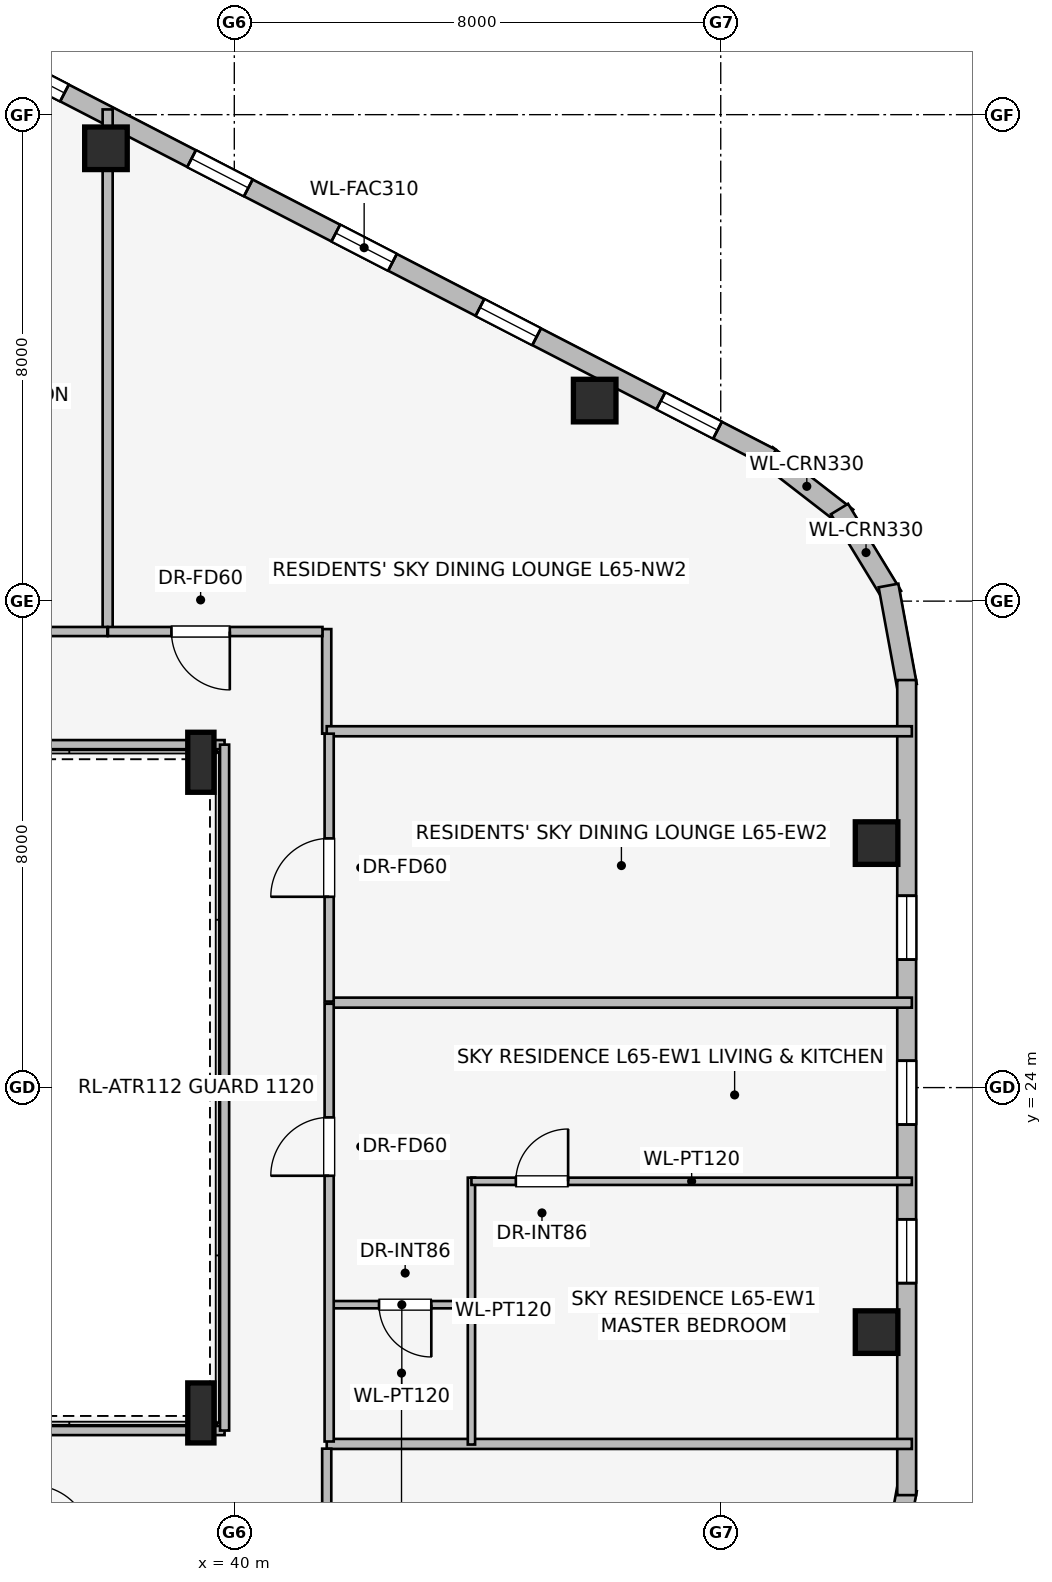
"""IFC4 building model, lengths in metres.
Left out: names, types, materials, properties, quantities, classifications, styles, units other than length and angle.
Written with IfcOpenShell. Run it as: python <this file> out.ifc"""

import sys

from ifc_helpers import new_model, si_unit, direction, frame, frame_2d, origin, origin_2d, place, context, subcontext, project, spatial, rectangle, i_section, extrude, element, fill, save


model = new_model("IFC4")
c1 = context("Model", 3, precision=1e-05, world=origin(), true_north=direction((0.0, 1.0)))
c2 = subcontext(c1, "Body", "Model", "MODEL_VIEW")
j1 = project(units=[si_unit("LENGTHUNIT", "METRE"), si_unit("PLANEANGLEUNIT", "RADIAN")], contexts=[c1])
p1 = place(None, origin())
s1 = spatial("IfcSite", under=j1, at=p1, CompositionType="ELEMENT")
p2 = place(p1, origin())
s2 = spatial("IfcBuilding", under=s1, at=p2, CompositionType="ELEMENT")
p3 = place(p2, frame((0.0, 0.0, 238.35)))
s3 = spatial("IfcBuildingStorey", under=s2, at=p3, CompositionType="ELEMENT", Elevation=238.35)
for number, where, z_axis, x_axis in (
    (1, (45.927, 35.298, 0.0), (0.0, 0.0, 1.0), (1.0, 0.0, 0.0)),
    (2, (37.889, 39.447, 0.0), (0.0, 0.0, 1.0), (1.0, 0.0, 0.0)),
    (3, (50.563, 19.979, 0.0), (0.0, 0.0, 1.0), (1.0, 0.0, 0.0)),
    (4, (50.563, 28.021, 0.0), (0.0, 0.0, 1.0), (1.0, 0.0, 0.0)),
):
    element("IfcColumn", number, at=place(p3, frame(where, z_axis=z_axis, x_axis=x_axis)), inside=s3, PredefinedType="COLUMN", context=c2, shape_type="SweptSolid", body=[
        extrude(rectangle(XDim=0.7, YDim=0.7, at=origin_2d()), origin(), (0.0, 0.0, 1.0), 3.55),
    ])
for number, where, z_axis, x_axis in (
    (5, (39.45, 18.65, 0.0), (0.0, 0.0, 1.0), (1.0, 0.0, 0.0)),
    (6, (39.45, 29.35, 0.0), (0.0, 0.0, 1.0), (1.0, 0.0, 0.0)),
):
    element("IfcColumn", number, at=place(p3, frame(where, z_axis=z_axis, x_axis=x_axis)), inside=s3, PredefinedType="COLUMN", context=c2, shape_type="SweptSolid", body=[
        extrude(i_section(OverallWidth=0.431, OverallDepth=0.987, WebThickness=0.034, FlangeThickness=0.062, at=origin_2d()), origin(), (0.0, 0.0, 1.0), 3.55),
    ])
p4 = place(p3, frame((48.753, 34.401, 0.0), z_axis=(0.0, 0.0, 1.0), x_axis=(0.790691856293, -0.61221433207, 0.0)))
e7 = element("IfcWall", 7, at=p4, inside=s3, PredefinedType="STANDARD", context=c2, shape_type="SweptSolid", body=[
    extrude(rectangle(XDim=1.676, YDim=0.33, at=frame_2d((0.838, 0.0))), origin(), (0.0, 0.0, 1.0), 3.26),
])
p5 = place(p3, frame((49.953, 33.515, 0.0), z_axis=(0.0, 0.0, 1.0), x_axis=(0.520325409202, -0.853968072318, 0.0)))
e8 = element("IfcWall", 8, at=p5, inside=s3, PredefinedType="STANDARD", context=c2, shape_type="SweptSolid", body=[
    extrude(rectangle(XDim=1.678, YDim=0.33, at=frame_2d((0.839, 0.0))), origin(), (0.0, 0.0, 1.0), 3.26),
])
p6 = place(p3, frame((50.759, 32.257, 0.0), z_axis=(0.0, 0.0, 1.0), x_axis=(0.180691763044, -0.983539773862, 0.0)))
e9 = element("IfcWall", 9, at=p6, inside=s3, PredefinedType="STANDARD", context=c2, shape_type="SweptSolid", body=[
    extrude(rectangle(XDim=1.677, YDim=0.33, at=frame_2d((0.838, 0.0))), origin(), (0.0, 0.0, 1.0), 3.26),
])
p7 = place(p3, frame((35.437, 41.27, 0.0), z_axis=(0.0, 0.0, 1.0), x_axis=(0.888581481622, -0.458718814218, 0.0)))
e10 = element("IfcWall", 10, at=p7, inside=s3, PredefinedType="STANDARD", context=c2, shape_type="SweptSolid", body=[
    extrude(rectangle(XDim=15.077, YDim=0.31, at=frame_2d((7.539, 0.0))), origin(), (0.0, 0.0, 1.0), 3.26),
])
p8 = place(p7, frame((0.942, 0.0, 0.75)))
e11 = element("IfcOpeningElement", 11, at=p8, cuts=e10, PredefinedType="OPENING", context=c2, shape_type="SweptSolid", body=[
    extrude(rectangle(XDim=1.05, YDim=1.4, at=frame_2d((0.525, 0.7))), frame((0.0, 0.165, 0.0), z_axis=(0.0, -1.0, 0.0), x_axis=(1.0, 0.0, 0.0)), (0.0, 0.0, 1.0), 0.33),
])
p9 = place(p7, frame((4.344, 0.0, 0.75)))
e12 = element("IfcOpeningElement", 12, at=p9, cuts=e10, PredefinedType="OPENING", context=c2, shape_type="SweptSolid", body=[
    extrude(rectangle(XDim=1.05, YDim=1.4, at=frame_2d((0.525, 0.7))), frame((0.0, 0.165, 0.0), z_axis=(0.0, -1.0, 0.0), x_axis=(1.0, 0.0, 0.0)), (0.0, 0.0, 1.0), 0.33),
])
p10 = place(p7, frame((7.013, 0.0, 0.75)))
e13 = element("IfcOpeningElement", 13, at=p10, cuts=e10, PredefinedType="OPENING", context=c2, shape_type="SweptSolid", body=[
    extrude(rectangle(XDim=1.05, YDim=1.4, at=frame_2d((0.525, 0.7))), frame((0.0, 0.165, 0.0), z_axis=(0.0, -1.0, 0.0), x_axis=(1.0, 0.0, 0.0)), (0.0, 0.0, 1.0), 0.33),
])
p11 = place(p7, frame((9.681, 0.0, 0.75)))
e14 = element("IfcOpeningElement", 14, at=p11, cuts=e10, PredefinedType="OPENING", context=c2, shape_type="SweptSolid", body=[
    extrude(rectangle(XDim=1.05, YDim=1.4, at=frame_2d((0.525, 0.7))), frame((0.0, 0.165, 0.0), z_axis=(0.0, -1.0, 0.0), x_axis=(1.0, 0.0, 0.0)), (0.0, 0.0, 1.0), 0.33),
])
p12 = place(p7, frame((13.029, 0.0, 0.75)))
e15 = element("IfcOpeningElement", 15, at=p12, cuts=e10, PredefinedType="OPENING", context=c2, shape_type="SweptSolid", body=[
    extrude(rectangle(XDim=1.05, YDim=1.4, at=frame_2d((0.525, 0.7))), frame((0.0, 0.165, 0.0), z_axis=(0.0, -1.0, 0.0), x_axis=(1.0, 0.0, 0.0)), (0.0, 0.0, 1.0), 0.33),
])
p13 = place(p3, frame((51.062, 17.392, 0.0), z_axis=(0.0, 0.0, 1.0), x_axis=(-0.180691763044, -0.983539773862, 0.0)))
e16 = element("IfcWall", 16, at=p13, inside=s3, PredefinedType="STANDARD", context=c2, shape_type="SweptSolid", body=[
    extrude(rectangle(XDim=1.677, YDim=0.33, at=frame_2d((0.838, 0.0))), origin(), (0.0, 0.0, 1.0), 3.26),
])
p14 = place(p3, frame((51.058, 30.702, 0.0), z_axis=(0.0, 0.0, 1.0), x_axis=(0.0, -1.0, 0.0)))
e17 = element("IfcWall", 17, at=p14, inside=s3, PredefinedType="STANDARD", context=c2, shape_type="SweptSolid", body=[
    extrude(rectangle(XDim=13.404, YDim=0.31, at=frame_2d((6.702, 0.0))), origin(), (0.0, 0.0, 1.0), 3.26),
])
p15 = place(p14, frame((3.547, 0.0, 0.75)))
e18 = element("IfcOpeningElement", 18, at=p15, cuts=e17, PredefinedType="OPENING", context=c2, shape_type="SweptSolid", body=[
    extrude(rectangle(XDim=1.05, YDim=1.4, at=frame_2d((0.525, 0.7))), frame((0.0, 0.165, 0.0), z_axis=(0.0, -1.0, 0.0), x_axis=(1.0, 0.0, 0.0)), (0.0, 0.0, 1.0), 0.33),
])
p16 = place(p14, frame((6.26, 0.0, 0.75)))
e19 = element("IfcOpeningElement", 19, at=p16, cuts=e17, PredefinedType="OPENING", context=c2, shape_type="SweptSolid", body=[
    extrude(rectangle(XDim=1.05, YDim=1.4, at=frame_2d((0.525, 0.7))), frame((0.0, 0.165, 0.0), z_axis=(0.0, -1.0, 0.0), x_axis=(1.0, 0.0, 0.0)), (0.0, 0.0, 1.0), 0.33),
])
p17 = place(p14, frame((8.868, 0.0, 0.75)))
e20 = element("IfcOpeningElement", 20, at=p17, cuts=e17, PredefinedType="OPENING", context=c2, shape_type="SweptSolid", body=[
    extrude(rectangle(XDim=1.05, YDim=1.4, at=frame_2d((0.525, 0.7))), frame((0.0, 0.165, 0.0), z_axis=(0.0, -1.0, 0.0), x_axis=(1.0, 0.0, 0.0)), (0.0, 0.0, 1.0), 0.33),
])
p18 = place(p3, frame((27.675, 18.36, 0.0), z_axis=(0.0, 0.0, 1.0), x_axis=(1.0, 0.0, 0.0)))
e21 = element("IfcWall", 21, at=p18, inside=s3, PredefinedType="PARTITIONING", context=c2, shape_type="SweptSolid", body=[
    extrude(rectangle(XDim=12.165, YDim=0.15, at=frame_2d((6.083, 0.0))), origin(), (0.0, 0.0, 1.0), 2.401),
])
p19 = place(p3, frame((39.84, 29.64, 0.0), z_axis=(0.0, 0.0, 1.0), x_axis=(-1.0, 0.0, 0.0)))
e22 = element("IfcWall", 22, at=p19, inside=s3, PredefinedType="PARTITIONING", context=c2, shape_type="SweptSolid", body=[
    extrude(rectangle(XDim=12.203, YDim=0.15, at=frame_2d((6.102, 0.0))), origin(), (0.0, 0.0, 1.0), 2.401),
])
p20 = place(p3, frame((39.84, 18.36, 0.0), z_axis=(0.0, 0.0, 1.0), x_axis=(0.0, 1.0, 0.0)))
e23 = element("IfcWall", 23, at=p20, inside=s3, PredefinedType="PARTITIONING", context=c2, shape_type="SweptSolid", body=[
    extrude(rectangle(XDim=11.28, YDim=0.15, at=frame_2d((5.64, 0.0))), origin(), (0.0, 0.0, 1.0), 3.26),
])
p21 = place(p3, frame((41.52, 29.82, 0.0), z_axis=(0.0, 0.0, 1.0), x_axis=(0.0, 1.0, 0.0)))
e24 = element("IfcWall", 24, at=p21, inside=s3, PredefinedType="PARTITIONING", context=c2, shape_type="SweptSolid", body=[
    extrude(rectangle(XDim=1.72, YDim=0.15, at=frame_2d((0.86, 0.0))), origin(), (0.0, 0.0, 1.0), 3.26),
])
p22 = place(p3, frame((37.917, 31.51, 0.0), z_axis=(0.0, 0.0, 1.0), x_axis=(0.0, 1.0, 0.0)))
e25 = element("IfcWall", 25, at=p22, inside=s3, PredefinedType="PARTITIONING", context=c2, shape_type="SweptSolid", body=[
    extrude(rectangle(XDim=8.576, YDim=0.165, at=frame_2d((4.288, 0.0))), origin(), (0.0, 0.0, 1.0), 2.649),
])
p23 = place(p3, frame((37.912, 31.5, 0.0), z_axis=(0.0, 0.0, 1.0), x_axis=(-1.0, 0.0, 0.0)))
e26 = element("IfcWall", 26, at=p23, inside=s3, PredefinedType="PARTITIONING", context=c2, shape_type="SweptSolid", body=[
    extrude(rectangle(XDim=3.622, YDim=0.15, at=frame_2d((1.811, 0.0))), origin(), (0.0, 0.0, 1.0), 3.26),
])
p24 = place(p23, frame((1.212, 0.0, 0.0)))
e27 = element("IfcOpeningElement", 27, at=p24, cuts=e26, PredefinedType="OPENING", context=c2, shape_type="SweptSolid", body=[
    extrude(rectangle(XDim=0.96, YDim=2.0, at=frame_2d((0.48, 1.0))), frame((0.0, 0.085, 0.0), z_axis=(0.0, -1.0, 0.0), x_axis=(1.0, 0.0, 0.0)), (0.0, 0.0, 1.0), 0.17),
])
p25 = place(p3, frame((41.45, 31.5, 0.0), z_axis=(0.0, 0.0, 1.0), x_axis=(-1.0, 0.0, 0.0)))
e28 = element("IfcWall", 28, at=p25, inside=s3, PredefinedType="PARTITIONING", context=c2, shape_type="SweptSolid", body=[
    extrude(rectangle(XDim=3.528, YDim=0.15, at=frame_2d((1.764, 0.0))), origin(), (0.0, 0.0, 1.0), 3.26),
])
p26 = place(p25, frame((1.524, 0.0, 0.0)))
e29 = element("IfcOpeningElement", 29, at=p26, cuts=e28, PredefinedType="OPENING", context=c2, shape_type="SweptSolid", body=[
    extrude(rectangle(XDim=0.96, YDim=2.0, at=frame_2d((0.48, 1.0))), frame((0.0, 0.085, 0.0), z_axis=(0.0, -1.0, 0.0), x_axis=(1.0, 0.0, 0.0)), (0.0, 0.0, 1.0), 0.17),
])
for number, where, z_axis, x_axis in (
    (30, (41.52, 18.14, 0.0), (0.0, 0.0, 1.0), (1.0, 0.0, 0.0)),
    (31, (41.52, 29.86, 0.0), (0.0, 0.0, 1.0), (1.0, 0.0, 0.0)),
):
    element("IfcWall", number, at=place(p3, frame(where, z_axis=z_axis, x_axis=x_axis)), inside=s3, PredefinedType="PARTITIONING", context=c2, shape_type="SweptSolid", body=[
        extrude(rectangle(XDim=9.623, YDim=0.165, at=frame_2d((4.812, 0.0))), origin(), (0.0, 0.0, 1.0), 3.26),
    ])
p27 = place(p3, frame((41.59, 25.397, 0.0), z_axis=(0.0, 0.0, 1.0), x_axis=(1.0, 0.0, 0.0)))
e32 = element("IfcWall", 32, at=p27, inside=s3, PredefinedType="PARTITIONING", context=c2, shape_type="SweptSolid", body=[
    extrude(rectangle(XDim=9.553, YDim=0.165, at=frame_2d((4.776, 0.0))), origin(), (0.0, 0.0, 1.0), 3.26),
])
p28 = place(p3, frame((43.9, 18.13, 0.0), z_axis=(0.0, 0.0, 1.0), x_axis=(0.0, 1.0, 0.0)))
e33 = element("IfcWall", 33, at=p28, inside=s3, PredefinedType="PARTITIONING", context=c2, shape_type="SweptSolid", body=[
    extrude(rectangle(XDim=4.389, YDim=0.12, at=frame_2d((2.195, 0.0))), origin(), (0.0, 0.0, 1.0), 3.26),
])
p29 = place(p3, frame((43.96, 20.43, 0.0), z_axis=(0.0, 0.0, 1.0), x_axis=(-1.0, 0.0, 0.0)))
e34 = element("IfcWall", 34, at=p29, inside=s3, PredefinedType="PARTITIONING", context=c2, shape_type="SweptSolid", body=[
    extrude(rectangle(XDim=2.41, YDim=0.12, at=frame_2d((1.205, 0.0))), origin(), (0.0, 0.0, 1.0), 3.26),
])
p30 = place(p29, frame((0.72, 0.0, 0.0)))
e35 = element("IfcOpeningElement", 35, at=p30, cuts=e34, PredefinedType="OPENING", context=c2, shape_type="SweptSolid", body=[
    extrude(rectangle(XDim=0.86, YDim=2.0, at=frame_2d((0.43, 1.0))), frame((0.0, 0.07, 0.0), z_axis=(0.0, -1.0, 0.0), x_axis=(1.0, 0.0, 0.0)), (0.0, 0.0, 1.0), 0.14),
])
p31 = place(p3, frame((43.9, 22.459, 0.0), z_axis=(0.0, 0.0, 1.0), x_axis=(1.0, 0.0, 0.0)))
e36 = element("IfcWall", 36, at=p31, inside=s3, PredefinedType="PARTITIONING", context=c2, shape_type="SweptSolid", body=[
    extrude(rectangle(XDim=7.243, YDim=0.12, at=frame_2d((3.622, 0.0))), origin(), (0.0, 0.0, 1.0), 3.26),
])
p32 = place(p31, frame((0.73, 0.0, 0.0)))
e37 = element("IfcOpeningElement", 37, at=p32, cuts=e36, PredefinedType="OPENING", context=c2, shape_type="SweptSolid", body=[
    extrude(rectangle(XDim=0.86, YDim=2.0, at=frame_2d((0.43, 1.0))), frame((0.0, 0.07, 0.0), z_axis=(0.0, -1.0, 0.0), x_axis=(1.0, 0.0, 0.0)), (0.0, 0.0, 1.0), 0.14),
])
p33 = place(p3, frame((41.56, 18.18, 0.0), z_axis=(0.0, 0.0, 1.0), x_axis=(0.0, 1.0, 0.0)))
e38 = element("IfcWall", 38, at=p33, inside=s3, PredefinedType="PARTITIONING", context=c2, shape_type="SweptSolid", body=[
    extrude(rectangle(XDim=7.199, YDim=0.15, at=frame_2d((3.6, 0.0))), origin(), (0.0, 0.0, 1.0), 3.26),
])
p34 = place(p33, frame((4.37, 0.0, 0.0)))
e39 = element("IfcOpeningElement", 39, at=p34, cuts=e38, PredefinedType="OPENING", context=c2, shape_type="SweptSolid", body=[
    extrude(rectangle(XDim=0.96, YDim=2.0, at=frame_2d((0.48, 1.0))), frame((0.0, 0.085, 0.0), z_axis=(0.0, -1.0, 0.0), x_axis=(1.0, 0.0, 0.0)), (0.0, 0.0, 1.0), 0.17),
])
p35 = place(p3, frame((41.56, 25.415, 0.0), z_axis=(0.0, 0.0, 1.0), x_axis=(0.0, 1.0, 0.0)))
e40 = element("IfcWall", 40, at=p35, inside=s3, PredefinedType="PARTITIONING", context=c2, shape_type="SweptSolid", body=[
    extrude(rectangle(XDim=4.405, YDim=0.15, at=frame_2d((2.203, 0.0))), origin(), (0.0, 0.0, 1.0), 3.26),
])
p36 = place(p35, frame((1.723, 0.0, 0.0)))
e41 = element("IfcOpeningElement", 41, at=p36, cuts=e40, PredefinedType="OPENING", context=c2, shape_type="SweptSolid", body=[
    extrude(rectangle(XDim=0.96, YDim=2.0, at=frame_2d((0.48, 1.0))), frame((0.0, 0.085, 0.0), z_axis=(0.0, -1.0, 0.0), x_axis=(1.0, 0.0, 0.0)), (0.0, 0.0, 1.0), 0.17),
])
p37 = place(p3, frame((41.52, 16.46, 0.0), z_axis=(0.0, 0.0, 1.0), x_axis=(0.0, 1.0, 0.0)))
e42 = element("IfcWall", 42, at=p37, inside=s3, PredefinedType="PARTITIONING", context=c2, shape_type="SweptSolid", body=[
    extrude(rectangle(XDim=1.602, YDim=0.15, at=frame_2d((0.801, 0.0))), origin(), (0.0, 0.0, 1.0), 3.26),
])
p38 = place(p8, origin())
e43 = element("IfcWindow", 43, at=p38, inside=s3, PartitioningType="SINGLE_PANEL", PredefinedType="WINDOW", context=c2, shape_type="SweptSolid", body=[
    extrude(rectangle(XDim=1.05, YDim=1.4, at=frame_2d((0.525, 0.7))), frame((0.0, 0.03, 0.0), z_axis=(0.0, -1.0, 0.0), x_axis=(1.0, 0.0, 0.0)), (0.0, 0.0, 1.0), 0.06),
])
fill(e11, e43)
p39 = place(p9, origin())
e44 = element("IfcWindow", 44, at=p39, inside=s3, PartitioningType="SINGLE_PANEL", PredefinedType="WINDOW", context=c2, shape_type="SweptSolid", body=[
    extrude(rectangle(XDim=1.05, YDim=1.4, at=frame_2d((0.525, 0.7))), frame((0.0, 0.03, 0.0), z_axis=(0.0, -1.0, 0.0), x_axis=(1.0, 0.0, 0.0)), (0.0, 0.0, 1.0), 0.06),
])
fill(e12, e44)
p40 = place(p10, origin())
e45 = element("IfcWindow", 45, at=p40, inside=s3, PartitioningType="SINGLE_PANEL", PredefinedType="WINDOW", context=c2, shape_type="SweptSolid", body=[
    extrude(rectangle(XDim=1.05, YDim=1.4, at=frame_2d((0.525, 0.7))), frame((0.0, 0.03, 0.0), z_axis=(0.0, -1.0, 0.0), x_axis=(1.0, 0.0, 0.0)), (0.0, 0.0, 1.0), 0.06),
])
fill(e13, e45)
p41 = place(p11, origin())
e46 = element("IfcWindow", 46, at=p41, inside=s3, PartitioningType="SINGLE_PANEL", PredefinedType="WINDOW", context=c2, shape_type="SweptSolid", body=[
    extrude(rectangle(XDim=1.05, YDim=1.4, at=frame_2d((0.525, 0.7))), frame((0.0, 0.03, 0.0), z_axis=(0.0, -1.0, 0.0), x_axis=(1.0, 0.0, 0.0)), (0.0, 0.0, 1.0), 0.06),
])
fill(e14, e46)
p42 = place(p12, origin())
e47 = element("IfcWindow", 47, at=p42, inside=s3, PartitioningType="SINGLE_PANEL", PredefinedType="WINDOW", context=c2, shape_type="SweptSolid", body=[
    extrude(rectangle(XDim=1.05, YDim=1.4, at=frame_2d((0.525, 0.7))), frame((0.0, 0.03, 0.0), z_axis=(0.0, -1.0, 0.0), x_axis=(1.0, 0.0, 0.0)), (0.0, 0.0, 1.0), 0.06),
])
fill(e15, e47)
p43 = place(p15, origin())
e48 = element("IfcWindow", 48, at=p43, inside=s3, PartitioningType="SINGLE_PANEL", PredefinedType="WINDOW", context=c2, shape_type="SweptSolid", body=[
    extrude(rectangle(XDim=1.05, YDim=1.4, at=frame_2d((0.525, 0.7))), frame((0.0, 0.03, 0.0), z_axis=(0.0, -1.0, 0.0), x_axis=(1.0, 0.0, 0.0)), (0.0, 0.0, 1.0), 0.06),
])
fill(e18, e48)
p44 = place(p16, origin())
e49 = element("IfcWindow", 49, at=p44, inside=s3, PartitioningType="SINGLE_PANEL", PredefinedType="WINDOW", context=c2, shape_type="SweptSolid", body=[
    extrude(rectangle(XDim=1.05, YDim=1.4, at=frame_2d((0.525, 0.7))), frame((0.0, 0.03, 0.0), z_axis=(0.0, -1.0, 0.0), x_axis=(1.0, 0.0, 0.0)), (0.0, 0.0, 1.0), 0.06),
])
fill(e19, e49)
p45 = place(p17, origin())
e50 = element("IfcWindow", 50, at=p45, inside=s3, PartitioningType="SINGLE_PANEL", PredefinedType="WINDOW", context=c2, shape_type="SweptSolid", body=[
    extrude(rectangle(XDim=1.05, YDim=1.4, at=frame_2d((0.525, 0.7))), frame((0.0, 0.03, 0.0), z_axis=(0.0, -1.0, 0.0), x_axis=(1.0, 0.0, 0.0)), (0.0, 0.0, 1.0), 0.06),
])
fill(e20, e50)
p46 = place(p26, origin())
e51 = element("IfcDoor", 51, at=p46, inside=s3, OperationType="SINGLE_SWING_LEFT", PredefinedType="DOOR", context=c2, shape_type="SweptSolid", body=[
    extrude(rectangle(XDim=0.96, YDim=2.0, at=frame_2d((0.48, 1.0))), frame((0.0, 0.025, 0.0), z_axis=(0.0, -1.0, 0.0), x_axis=(1.0, 0.0, 0.0)), (0.0, 0.0, 1.0), 0.05),
])
fill(e29, e51)
p47 = place(p30, origin())
e52 = element("IfcDoor", 52, at=p47, inside=s3, OperationType="SINGLE_SWING_LEFT", PredefinedType="DOOR", context=c2, shape_type="SweptSolid", body=[
    extrude(rectangle(XDim=0.86, YDim=2.0, at=frame_2d((0.43, 1.0))), frame((0.0, 0.025, 0.0), z_axis=(0.0, -1.0, 0.0), x_axis=(1.0, 0.0, 0.0)), (0.0, 0.0, 1.0), 0.05),
])
fill(e35, e52)
p48 = place(p32, origin())
e53 = element("IfcDoor", 53, at=p48, inside=s3, OperationType="SINGLE_SWING_RIGHT", PredefinedType="DOOR", context=c2, shape_type="SweptSolid", body=[
    extrude(rectangle(XDim=0.86, YDim=2.0, at=frame_2d((0.43, 1.0))), frame((0.0, 0.025, 0.0), z_axis=(0.0, -1.0, 0.0), x_axis=(1.0, 0.0, 0.0)), (0.0, 0.0, 1.0), 0.05),
])
fill(e37, e53)
p49 = place(p34, origin())
e54 = element("IfcDoor", 54, at=p49, inside=s3, OperationType="SINGLE_SWING_LEFT", PredefinedType="DOOR", context=c2, shape_type="SweptSolid", body=[
    extrude(rectangle(XDim=0.96, YDim=2.0, at=frame_2d((0.48, 1.0))), frame((0.0, 0.025, 0.0), z_axis=(0.0, -1.0, 0.0), x_axis=(1.0, 0.0, 0.0)), (0.0, 0.0, 1.0), 0.05),
])
fill(e39, e54)
p50 = place(p36, origin())
e55 = element("IfcDoor", 55, at=p50, inside=s3, OperationType="SINGLE_SWING_LEFT", PredefinedType="DOOR", context=c2, shape_type="SweptSolid", body=[
    extrude(rectangle(XDim=0.96, YDim=2.0, at=frame_2d((0.48, 1.0))), frame((0.0, 0.025, 0.0), z_axis=(0.0, -1.0, 0.0), x_axis=(1.0, 0.0, 0.0)), (0.0, 0.0, 1.0), 0.05),
])
fill(e41, e55)
save(model, sys.argv[1])
